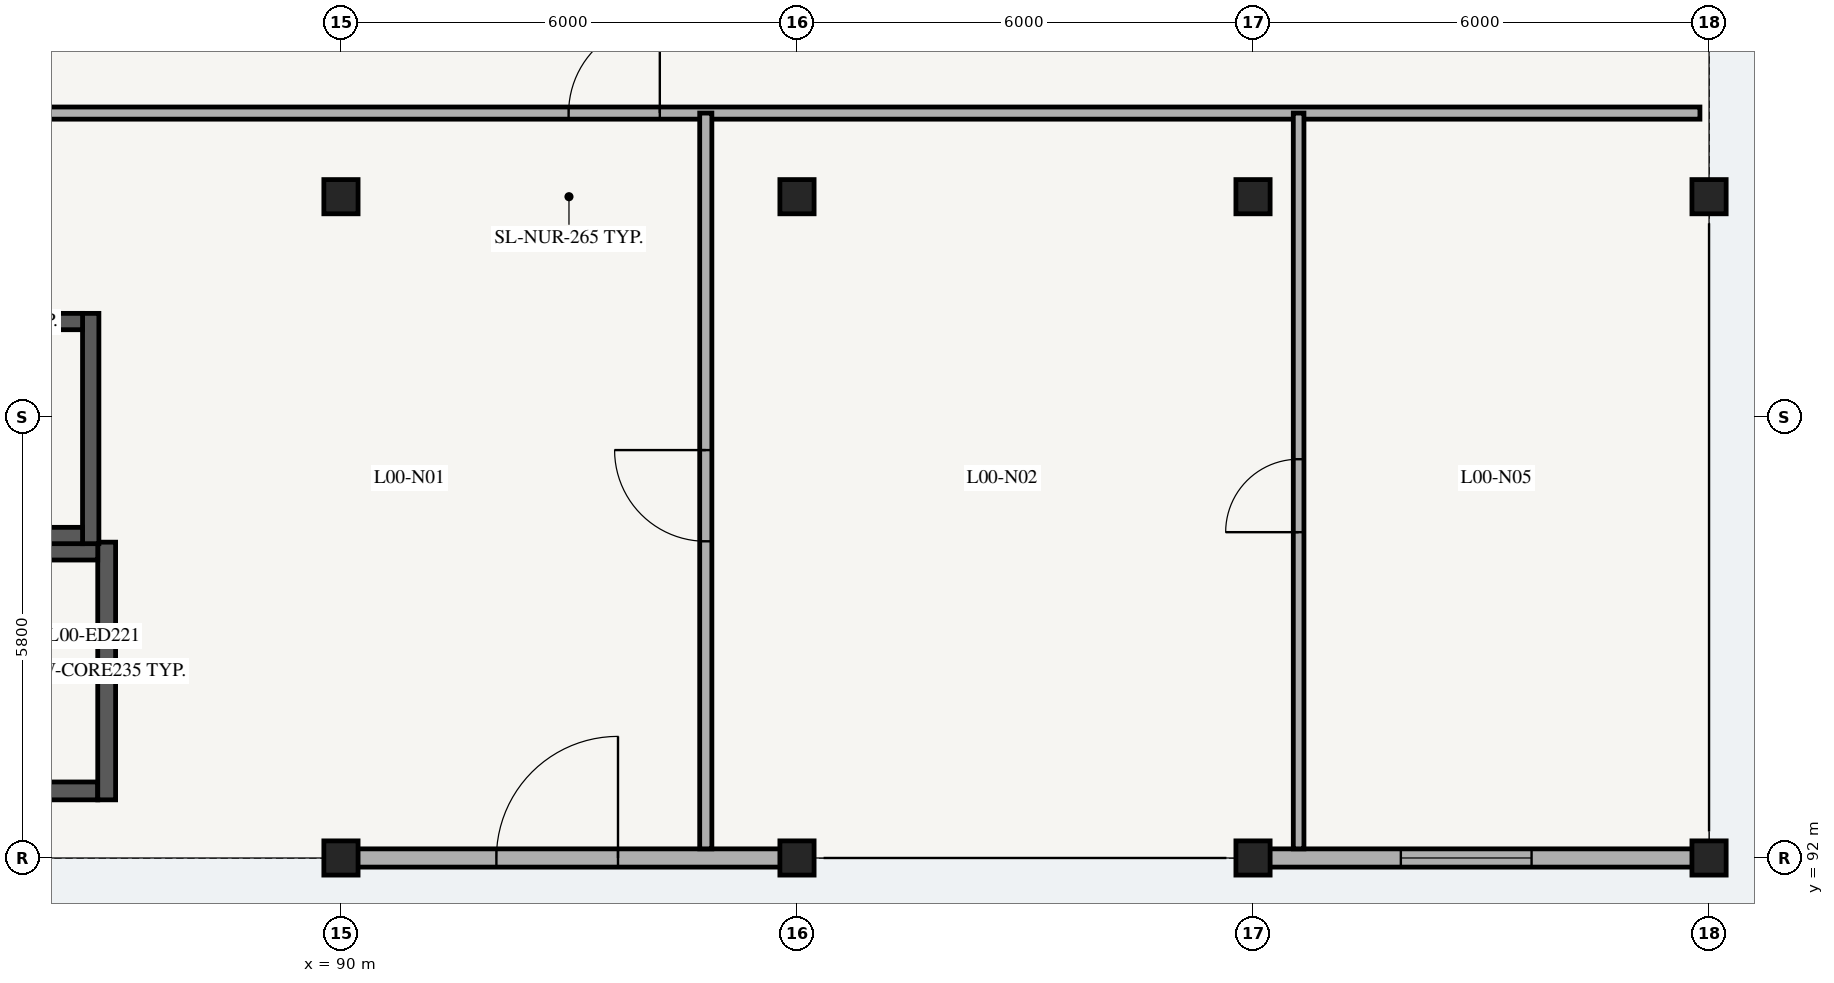
"""IFC4 building model, lengths in metres.
Left out: names, types, materials, properties, quantities, classifications, styles, units other than length and angle.
Written with IfcOpenShell. Run it as: python <this file> out.ifc"""

import sys

from ifc_helpers import new_model, si_unit, direction, frame, frame_2d, origin, origin_2d, place, context, subcontext, project, spatial, rectangle, extrude, element, fill, save


model = new_model("IFC4")
c1 = context("Model", 3, precision=1e-05, world=origin(), true_north=direction((0.0, 1.0)))
c2 = subcontext(c1, "Body", "Model", "MODEL_VIEW")
j1 = project(units=[si_unit("LENGTHUNIT", "METRE"), si_unit("PLANEANGLEUNIT", "RADIAN")], contexts=[c1])
p1 = place(None, origin())
s1 = spatial("IfcSite", under=j1, at=p1, CompositionType="ELEMENT")
p2 = place(p1, origin())
s2 = spatial("IfcBuilding", under=s1, at=p2, CompositionType="ELEMENT")
p3 = place(p2, origin())
s3 = spatial("IfcBuildingStorey", under=s2, at=p3, CompositionType="ELEMENT", Elevation=0.0)
p4 = place(p3, frame((80.2, 92.883, 0.0), z_axis=(0.0, 0.0, 1.0), x_axis=(1.0, 0.0, 0.0)))
e1 = element("IfcWall", 1, at=p4, inside=s3, PredefinedType="SHEAR", context=c2, shape_type="SweptSolid", body=[
    extrude(rectangle(XDim=6.6, YDim=0.235, at=frame_2d((3.3, 0.0))), origin(), (0.0, 0.0, 1.0), 4.495),
])
p5 = place(p3, frame((86.917, 92.765, 0.0), z_axis=(0.0, 0.0, 1.0), x_axis=(0.0, 1.0, 0.0)))
e2 = element("IfcWall", 2, at=p5, inside=s3, PredefinedType="SHEAR", context=c2, shape_type="SweptSolid", body=[
    extrude(rectangle(XDim=3.39, YDim=0.235, at=frame_2d((1.695, 0.0))), origin(), (0.0, 0.0, 1.0), 4.495),
])
p6 = place(p3, frame((80.2, 96.038, 0.0), z_axis=(0.0, 0.0, 1.0), x_axis=(1.0, 0.0, 0.0)))
e3 = element("IfcWall", 3, at=p6, inside=s3, PredefinedType="SHEAR", context=c2, shape_type="SweptSolid", body=[
    extrude(rectangle(XDim=6.6, YDim=0.235, at=frame_2d((3.3, 0.0))), origin(), (0.0, 0.0, 1.0), 4.495),
])
p7 = place(p3, frame((86.708, 96.135, 0.0), z_axis=(0.0, 0.0, 1.0), x_axis=(0.0, 1.0, 0.0)))
e4 = element("IfcWall", 4, at=p7, inside=s3, PredefinedType="SHEAR", context=c2, shape_type="SweptSolid", body=[
    extrude(rectangle(XDim=3.03, YDim=0.215, at=frame_2d((1.515, 0.0))), origin(), (0.0, 0.0, 1.0), 4.495),
])
for number, where, z_axis, x_axis in (
    (5, (84.0, 96.242, 0.0), (0.0, 0.0, 1.0), (1.0, 0.0, 0.0)),
    (6, (84.0, 99.058, 0.0), (0.0, 0.0, 1.0), (1.0, 0.0, 0.0)),
):
    element("IfcWall", number, at=place(p3, frame(where, z_axis=z_axis, x_axis=x_axis)), inside=s3, PredefinedType="SHEAR", context=c2, shape_type="SweptSolid", body=[
        extrude(rectangle(XDim=2.6, YDim=0.215, at=frame_2d((1.3, 0.0))), origin(), (0.0, 0.0, 1.0), 4.495),
    ])
for number, where, z_axis, x_axis in (
    (7, (90.0, 92.0, 0.0), (0.0, 0.0, 1.0), (1.0, 0.0, 0.0)),
    (8, (90.0, 100.7, 0.0), (0.0, 0.0, 1.0), (1.0, 0.0, 0.0)),
    (9, (96.0, 92.0, 0.0), (0.0, 0.0, 1.0), (1.0, 0.0, 0.0)),
    (10, (96.0, 100.7, 0.0), (0.0, 0.0, 1.0), (1.0, 0.0, 0.0)),
    (11, (102.0, 92.0, 0.0), (0.0, 0.0, 1.0), (1.0, 0.0, 0.0)),
    (12, (102.0, 100.7, 0.0), (0.0, 0.0, 1.0), (1.0, 0.0, 0.0)),
    (13, (108.0, 92.0, 0.0), (0.0, 0.0, 1.0), (1.0, 0.0, 0.0)),
    (14, (108.0, 100.7, 0.0), (0.0, 0.0, 1.0), (1.0, 0.0, 0.0)),
):
    element("IfcColumn", number, at=place(p3, frame(where, z_axis=z_axis, x_axis=x_axis)), inside=s3, PredefinedType="COLUMN", context=c2, shape_type="SweptSolid", body=[
        extrude(rectangle(XDim=0.45, YDim=0.45, at=origin_2d()), origin(), (0.0, 0.0, 1.0), 4.495),
    ])
p8 = place(p3, frame((90.195, 92.0, 0.0), z_axis=(0.0, 0.0, 1.0), x_axis=(1.0, 0.0, 0.0)))
e15 = element("IfcWall", 15, at=p8, inside=s3, PredefinedType="SOLIDWALL", context=c2, shape_type="SweptSolid", body=[
    extrude(rectangle(XDim=5.61, YDim=0.24, at=frame_2d((2.805, 0.0))), origin(), (0.0, 0.0, 1.0), 3.75),
])
p9 = place(p8, frame((1.85, 0.0, 0.0)))
e16 = element("IfcOpeningElement", 16, at=p9, cuts=e15, PredefinedType="OPENING", context=c2, shape_type="SweptSolid", body=[
    extrude(rectangle(XDim=1.6, YDim=2.25, at=frame_2d((0.8, 1.125))), frame((0.0, 0.13, 0.0), z_axis=(0.0, -1.0, 0.0), x_axis=(1.0, 0.0, 0.0)), (0.0, 0.0, 1.0), 0.26),
])
p10 = place(p3, frame((102.195, 92.0, 0.0), z_axis=(0.0, 0.0, 1.0), x_axis=(1.0, 0.0, 0.0)))
e17 = element("IfcWall", 17, at=p10, inside=s3, PredefinedType="SOLIDWALL", context=c2, shape_type="SweptSolid", body=[
    extrude(rectangle(XDim=5.61, YDim=0.24, at=frame_2d((2.805, 0.0))), origin(), (0.0, 0.0, 1.0), 3.75),
])
p11 = place(p10, frame((1.75, 0.0, 0.65)))
e18 = element("IfcOpeningElement", 18, at=p11, cuts=e17, PredefinedType="OPENING", context=c2, shape_type="SweptSolid", body=[
    extrude(rectangle(XDim=1.72, YDim=1.64, at=frame_2d((0.86, 0.82))), frame((0.0, 0.13, 0.0), z_axis=(0.0, -1.0, 0.0), x_axis=(1.0, 0.0, 0.0)), (0.0, 0.0, 1.0), 0.26),
])
p12 = place(p3, frame((78.12, 101.8, 0.0), z_axis=(0.0, 0.0, 1.0), x_axis=(1.0, 0.0, 0.0)))
e19 = element("IfcWall", 19, at=p12, inside=s3, PredefinedType="PARTITIONING", context=c2, shape_type="SweptSolid", body=[
    extrude(rectangle(XDim=29.76, YDim=0.16, at=frame_2d((14.88, 0.0))), origin(), (0.0, 0.0, 1.0), 3.52),
])
p13 = place(p12, frame((2.971, 0.0, 0.0)))
e20 = element("IfcOpeningElement", 20, at=p13, cuts=e19, PredefinedType="OPENING", context=c2, shape_type="SweptSolid", body=[
    extrude(rectangle(XDim=1.2, YDim=2.15, at=frame_2d((0.6, 1.075))), frame((0.0, 0.09, 0.0), z_axis=(0.0, -1.0, 0.0), x_axis=(1.0, 0.0, 0.0)), (0.0, 0.0, 1.0), 0.18),
])
p14 = place(p12, frame((14.875, 0.0, 0.0)))
e21 = element("IfcOpeningElement", 21, at=p14, cuts=e19, PredefinedType="OPENING", context=c2, shape_type="SweptSolid", body=[
    extrude(rectangle(XDim=1.2, YDim=2.15, at=frame_2d((0.6, 1.075))), frame((0.0, 0.09, 0.0), z_axis=(0.0, -1.0, 0.0), x_axis=(1.0, 0.0, 0.0)), (0.0, 0.0, 1.0), 0.18),
])
p15 = place(p3, frame((94.8, 92.12, 0.0), z_axis=(0.0, 0.0, 1.0), x_axis=(0.0, 1.0, 0.0)))
e22 = element("IfcWall", 22, at=p15, inside=s3, PredefinedType="PARTITIONING", context=c2, shape_type="SweptSolid", body=[
    extrude(rectangle(XDim=9.68, YDim=0.16, at=frame_2d((4.84, 0.0))), origin(), (0.0, 0.0, 1.0), 3.52),
])
p16 = place(p15, frame((4.046, 0.0, 0.0)))
e23 = element("IfcOpeningElement", 23, at=p16, cuts=e22, PredefinedType="OPENING", context=c2, shape_type="SweptSolid", body=[
    extrude(rectangle(XDim=1.2, YDim=2.15, at=frame_2d((0.6, 1.075))), frame((0.0, 0.09, 0.0), z_axis=(0.0, -1.0, 0.0), x_axis=(1.0, 0.0, 0.0)), (0.0, 0.0, 1.0), 0.18),
])
p17 = place(p3, frame((102.6, 92.12, 0.0), z_axis=(0.0, 0.0, 1.0), x_axis=(0.0, 1.0, 0.0)))
e24 = element("IfcWall", 24, at=p17, inside=s3, PredefinedType="PLUMBINGWALL", context=c2, shape_type="SweptSolid", body=[
    extrude(rectangle(XDim=9.68, YDim=0.14, at=frame_2d((4.84, 0.0))), origin(), (0.0, 0.0, 1.0), 3.52),
])
p18 = place(p17, frame((4.167, 0.0, 0.0)))
e25 = element("IfcOpeningElement", 25, at=p18, cuts=e24, PredefinedType="OPENING", context=c2, shape_type="SweptSolid", body=[
    extrude(rectangle(XDim=0.96, YDim=2.1, at=frame_2d((0.48, 1.05))), frame((0.0, 0.08, 0.0), z_axis=(0.0, -1.0, 0.0), x_axis=(1.0, 0.0, 0.0)), (0.0, 0.0, 1.0), 0.16),
])
p19 = place(p9, origin())
e26 = element("IfcDoor", 26, at=p19, inside=s3, OperationType="DOUBLE_DOOR_SINGLE_SWING", PredefinedType="DOOR", context=c2, shape_type="SweptSolid", body=[
    extrude(rectangle(XDim=1.6, YDim=2.25, at=frame_2d((0.8, 1.125))), frame((0.0, 0.025, 0.0), z_axis=(0.0, -1.0, 0.0), x_axis=(1.0, 0.0, 0.0)), (0.0, 0.0, 1.0), 0.05),
])
fill(e16, e26)
p20 = place(p11, origin())
e27 = element("IfcWindow", 27, at=p20, inside=s3, PartitioningType="SINGLE_PANEL", PredefinedType="WINDOW", context=c2, shape_type="SweptSolid", body=[
    extrude(rectangle(XDim=1.72, YDim=1.64, at=frame_2d((0.86, 0.82))), frame((0.0, 0.03, 0.0), z_axis=(0.0, -1.0, 0.0), x_axis=(1.0, 0.0, 0.0)), (0.0, 0.0, 1.0), 0.06),
])
fill(e18, e27)
p21 = place(p14, origin())
e28 = element("IfcDoor", 28, at=p21, inside=s3, OperationType="SINGLE_SWING_RIGHT", PredefinedType="DOOR", context=c2, shape_type="SweptSolid", body=[
    extrude(rectangle(XDim=1.2, YDim=2.15, at=frame_2d((0.6, 1.075))), frame((0.0, 0.025, 0.0), z_axis=(0.0, -1.0, 0.0), x_axis=(1.0, 0.0, 0.0)), (0.0, 0.0, 1.0), 0.05),
])
fill(e21, e28)
p22 = place(p16, origin())
e29 = element("IfcDoor", 29, at=p22, inside=s3, OperationType="SINGLE_SWING_RIGHT", PredefinedType="DOOR", context=c2, shape_type="SweptSolid", body=[
    extrude(rectangle(XDim=1.2, YDim=2.15, at=frame_2d((0.6, 1.075))), frame((0.0, 0.025, 0.0), z_axis=(0.0, -1.0, 0.0), x_axis=(1.0, 0.0, 0.0)), (0.0, 0.0, 1.0), 0.05),
])
fill(e23, e29)
p23 = place(p18, origin())
e30 = element("IfcDoor", 30, at=p23, inside=s3, OperationType="SINGLE_SWING_LEFT", PredefinedType="DOOR", context=c2, shape_type="SweptSolid", body=[
    extrude(rectangle(XDim=0.96, YDim=2.1, at=frame_2d((0.48, 1.05))), frame((0.0, 0.025, 0.0), z_axis=(0.0, -1.0, 0.0), x_axis=(1.0, 0.0, 0.0)), (0.0, 0.0, 1.0), 0.05),
])
fill(e25, e30)
save(model, sys.argv[1])
